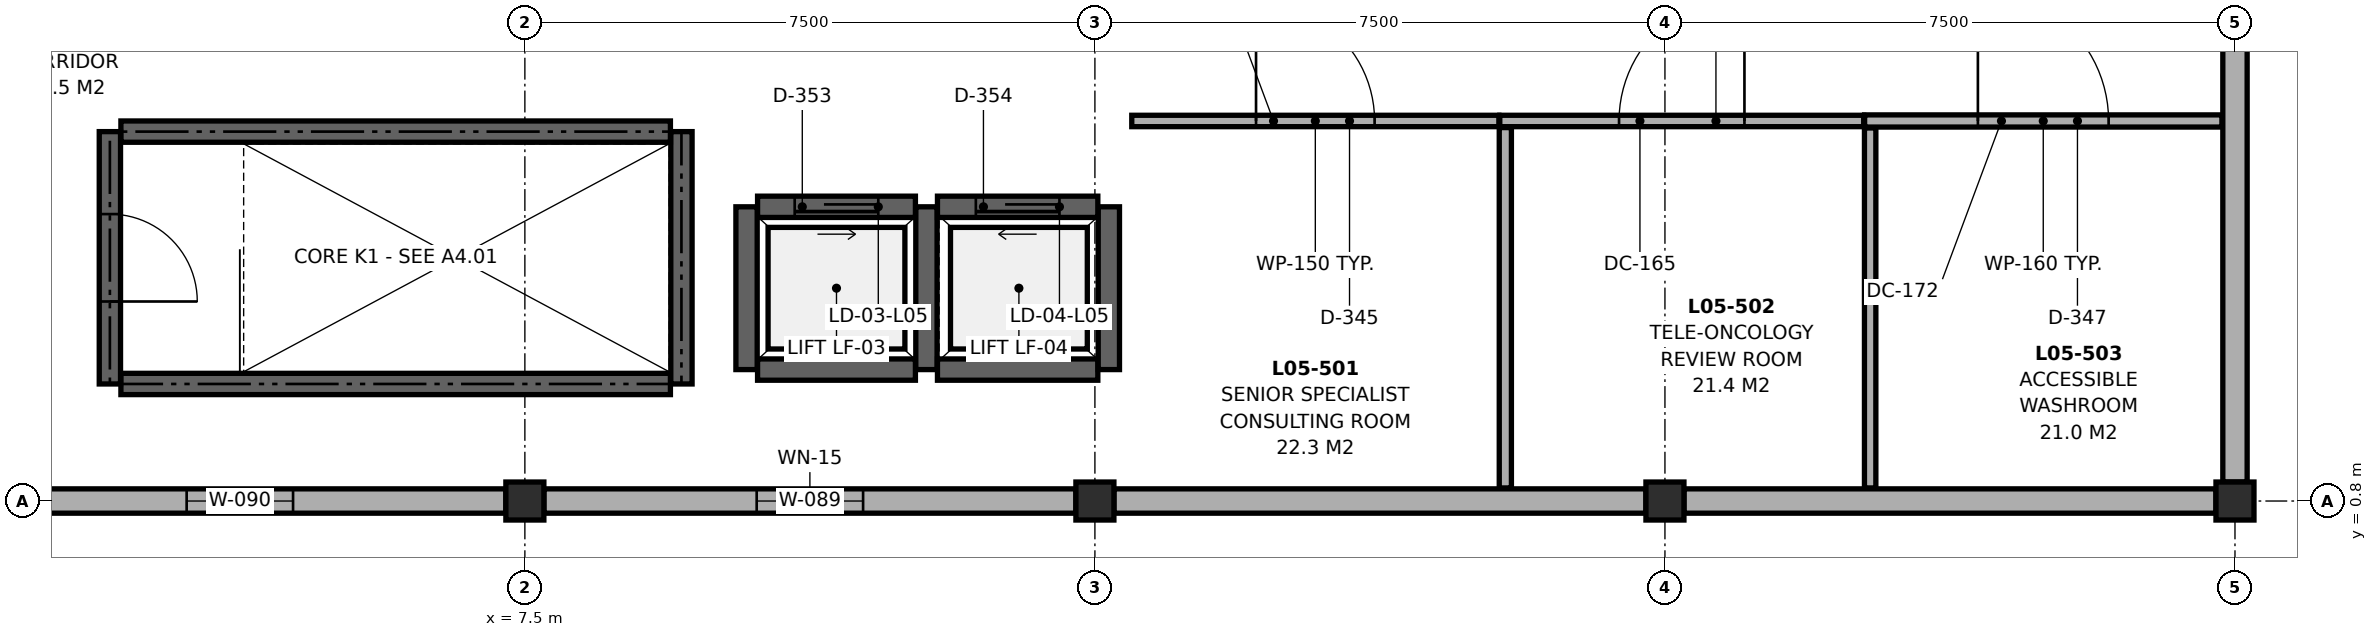
"""IFC4 building model, lengths in metres.
Left out: names, types, materials, properties, quantities, classifications, styles, units other than length and angle.
Written with IfcOpenShell. Run it as: python <this file> out.ifc"""

import sys

from ifc_helpers import new_model, si_unit, direction, frame, frame_2d, origin, origin_2d, place, context, subcontext, project, spatial, rectangle, extrude, element, fill, save


model = new_model("IFC4")
c1 = context("Model", 3, precision=1e-05, world=origin(), true_north=direction((0.0, 1.0)))
c2 = subcontext(c1, "Body", "Model", "MODEL_VIEW")
j1 = project(units=[si_unit("LENGTHUNIT", "METRE"), si_unit("PLANEANGLEUNIT", "RADIAN")], contexts=[c1])
p1 = place(None, origin())
s1 = spatial("IfcSite", under=j1, at=p1, CompositionType="ELEMENT")
p2 = place(p1, origin())
s2 = spatial("IfcBuilding", under=s1, at=p2, CompositionType="ELEMENT")
p3 = place(p2, frame((0.0, 0.0, 21.5)))
s3 = spatial("IfcBuildingStorey", under=s2, at=p3, CompositionType="ELEMENT", Elevation=21.5)
p4 = place(p3, frame((7.5, 0.8, 0.0), z_axis=(0.0, 0.0, 1.0), x_axis=(1.0, 0.0, 0.0)))
e1 = element("IfcColumn", 1, at=p4, inside=s3, PredefinedType="COLUMN", context=c2, shape_type="SweptSolid", body=[
    extrude(rectangle(XDim=0.5, YDim=0.5, at=origin_2d()), origin(), (0.0, 0.0, 1.0), 4.08),
])
p5 = place(p3, frame((15.0, 0.8, 0.0), z_axis=(0.0, 0.0, 1.0), x_axis=(1.0, 0.0, 0.0)))
e2 = element("IfcColumn", 2, at=p5, inside=s3, PredefinedType="COLUMN", context=c2, shape_type="SweptSolid", body=[
    extrude(rectangle(XDim=0.5, YDim=0.5, at=origin_2d()), origin(), (0.0, 0.0, 1.0), 4.33),
])
p6 = place(p3, frame((22.5, 0.8, 0.0), z_axis=(0.0, 0.0, 1.0), x_axis=(1.0, 0.0, 0.0)))
e3 = element("IfcColumn", 3, at=p6, inside=s3, PredefinedType="COLUMN", context=c2, shape_type="SweptSolid", body=[
    extrude(rectangle(XDim=0.5, YDim=0.5, at=origin_2d()), origin(), (0.0, 0.0, 1.0), 4.58),
])
p7 = place(p3, frame((30.0, 0.8, 0.0), z_axis=(0.0, 0.0, 1.0), x_axis=(1.0, 0.0, 0.0)))
e4 = element("IfcColumn", 4, at=p7, inside=s3, PredefinedType="COLUMN", context=c2, shape_type="SweptSolid", body=[
    extrude(rectangle(XDim=0.5, YDim=0.5, at=origin_2d()), origin(), (0.0, 0.0, 1.0), 4.83),
])
for number, where, z_axis, x_axis in (
    (5, (30.0, 8.05, 0.0), (0.0, 0.0, 1.0), (0.0, -1.0, 0.0)),
    (6, (29.75, 0.8, 0.0), (0.0, 0.0, 1.0), (-1.0, 0.0, 0.0)),
    (7, (22.25, 0.8, 0.0), (0.0, 0.0, 1.0), (-1.0, 0.0, 0.0)),
):
    element("IfcWall", number, at=place(p3, frame(where, z_axis=z_axis, x_axis=x_axis)), inside=s3, PredefinedType="SOLIDWALL", context=c2, shape_type="SweptSolid", body=[
        extrude(rectangle(XDim=7.0, YDim=0.32, at=frame_2d((3.5, 0.0))), origin(), (0.0, 0.0, 1.0), 3.7),
    ])
p8 = place(p3, frame((14.75, 0.8, 0.0), z_axis=(0.0, 0.0, 1.0), x_axis=(-1.0, 0.0, 0.0)))
e8 = element("IfcWall", 8, at=p8, inside=s3, PredefinedType="SOLIDWALL", context=c2, shape_type="SweptSolid", body=[
    extrude(rectangle(XDim=7.0, YDim=0.32, at=frame_2d((3.5, 0.0))), origin(), (0.0, 0.0, 1.0), 3.7),
])
p9 = place(p8, frame((2.8, 0.0, 0.9)))
e9 = element("IfcOpeningElement", 9, at=p9, cuts=e8, PredefinedType="OPENING", context=c2, shape_type="SweptSolid", body=[
    extrude(rectangle(XDim=1.4, YDim=1.7, at=frame_2d((0.7, 0.85))), frame((0.0, 0.172, 0.0), z_axis=(0.0, -1.0, 0.0), x_axis=(1.0, 0.0, 0.0)), (0.0, 0.0, 1.0), 0.344),
])
p10 = place(p3, frame((7.25, 0.8, 0.0), z_axis=(0.0, 0.0, 1.0), x_axis=(-1.0, 0.0, 0.0)))
e10 = element("IfcWall", 10, at=p10, inside=s3, PredefinedType="SOLIDWALL", context=c2, shape_type="SweptSolid", body=[
    extrude(rectangle(XDim=7.0, YDim=0.32, at=frame_2d((3.5, 0.0))), origin(), (0.0, 0.0, 1.0), 3.7),
])
p11 = place(p10, frame((2.8, 0.0, 0.9)))
e11 = element("IfcOpeningElement", 11, at=p11, cuts=e10, PredefinedType="OPENING", context=c2, shape_type="SweptSolid", body=[
    extrude(rectangle(XDim=1.4, YDim=1.9, at=frame_2d((0.7, 0.95))), frame((0.0, 0.172, 0.0), z_axis=(0.0, -1.0, 0.0), x_axis=(1.0, 0.0, 0.0)), (0.0, 0.0, 1.0), 0.344),
])
p12 = place(p3, frame((2.185, 2.34, 0.0), z_axis=(0.0, 0.0, 1.0), x_axis=(1.0, 0.0, 0.0)))
e12 = element("IfcWall", 12, at=p12, inside=s3, PredefinedType="SHEAR", context=c2, shape_type="SweptSolid", body=[
    extrude(rectangle(XDim=7.23, YDim=0.28, at=frame_2d((3.615, 0.0))), origin(), (0.0, 0.0, 1.0), 3.72),
])
p13 = place(p3, frame((9.56, 2.34, 0.0), z_axis=(0.0, 0.0, 1.0), x_axis=(0.0, 1.0, 0.0)))
e13 = element("IfcWall", 13, at=p13, inside=s3, PredefinedType="SHEAR", context=c2, shape_type="SweptSolid", body=[
    extrude(rectangle(XDim=3.32, YDim=0.28, at=frame_2d((1.66, 0.0))), origin(), (0.0, 0.0, 1.0), 3.72),
])
p14 = place(p3, frame((9.415, 5.66, 0.0), z_axis=(0.0, 0.0, 1.0), x_axis=(-1.0, 0.0, 0.0)))
e14 = element("IfcWall", 14, at=p14, inside=s3, PredefinedType="SHEAR", context=c2, shape_type="SweptSolid", body=[
    extrude(rectangle(XDim=7.23, YDim=0.28, at=frame_2d((3.615, 0.0))), origin(), (0.0, 0.0, 1.0), 3.72),
])
p15 = place(p3, frame((2.04, 5.66, 0.0), z_axis=(0.0, 0.0, 1.0), x_axis=(0.0, -1.0, 0.0)))
e15 = element("IfcWall", 15, at=p15, inside=s3, PredefinedType="SHEAR", context=c2, shape_type="SweptSolid", body=[
    extrude(rectangle(XDim=3.32, YDim=0.28, at=frame_2d((1.66, 0.0))), origin(), (0.0, 0.0, 1.0), 3.72),
])
p16 = place(p15, frame((1.085, 0.0, 0.0)))
e16 = element("IfcOpeningElement", 16, at=p16, cuts=e15, PredefinedType="OPENING", context=c2, shape_type="SweptSolid", body=[
    extrude(rectangle(XDim=1.15, YDim=2.15, at=frame_2d((0.575, 1.075))), frame((0.0, 0.152, 0.0), z_axis=(0.0, -1.0, 0.0), x_axis=(1.0, 0.0, 0.0)), (0.0, 0.0, 1.0), 0.304),
])
p17 = place(p3, frame((10.562, 2.529, 0.0), z_axis=(0.0, 0.0, 1.0), x_axis=(1.0, 0.0, 0.0)))
e17 = element("IfcWall", 17, at=p17, inside=s3, PredefinedType="SHEAR", context=c2, shape_type="SweptSolid", body=[
    extrude(rectangle(XDim=2.077, YDim=0.28, at=frame_2d((1.039, 0.0))), origin(), (0.0, 0.0, 1.0), 5.3),
])
p18 = place(p3, frame((12.783, 2.529, 0.0), z_axis=(0.0, 0.0, 1.0), x_axis=(0.0, 1.0, 0.0)))
e18 = element("IfcWall", 18, at=p18, inside=s3, PredefinedType="SHEAR", context=c2, shape_type="SweptSolid", body=[
    extrude(rectangle(XDim=2.141, YDim=0.28, at=frame_2d((1.071, 0.0))), origin(), (0.0, 0.0, 1.0), 5.3),
])
p19 = place(p3, frame((12.638, 4.671, 0.0), z_axis=(0.0, 0.0, 1.0), x_axis=(-1.0, 0.0, 0.0)))
e19 = element("IfcWall", 19, at=p19, inside=s3, PredefinedType="SHEAR", context=c2, shape_type="SweptSolid", body=[
    extrude(rectangle(XDim=2.077, YDim=0.28, at=frame_2d((1.039, 0.0))), origin(), (0.0, 0.0, 1.0), 5.3),
])
p20 = place(p19, frame((0.489, 0.0, 0.0)))
e20 = element("IfcOpeningElement", 20, at=p20, cuts=e19, PredefinedType="OPENING", context=c2, shape_type="SweptSolid", body=[
    extrude(rectangle(XDim=1.1, YDim=2.15, at=frame_2d((0.55, 1.075))), frame((0.0, 0.152, 0.0), z_axis=(0.0, -1.0, 0.0), x_axis=(1.0, 0.0, 0.0)), (0.0, 0.0, 1.0), 0.304),
])
p21 = place(p3, frame((10.417, 4.671, 0.0), z_axis=(0.0, 0.0, 1.0), x_axis=(0.0, -1.0, 0.0)))
e21 = element("IfcWall", 21, at=p21, inside=s3, PredefinedType="SHEAR", context=c2, shape_type="SweptSolid", body=[
    extrude(rectangle(XDim=2.141, YDim=0.28, at=frame_2d((1.071, 0.0))), origin(), (0.0, 0.0, 1.0), 5.3),
])
p22 = place(p3, frame((12.928, 2.529, 0.0), z_axis=(0.0, 0.0, 1.0), x_axis=(1.0, 0.0, 0.0)))
e22 = element("IfcWall", 22, at=p22, inside=s3, PredefinedType="SHEAR", context=c2, shape_type="SweptSolid", body=[
    extrude(rectangle(XDim=2.11, YDim=0.28, at=frame_2d((1.055, 0.0))), origin(), (0.0, 0.0, 1.0), 5.3),
])
p23 = place(p3, frame((15.184, 2.529, 0.0), z_axis=(0.0, 0.0, 1.0), x_axis=(0.0, 1.0, 0.0)))
e23 = element("IfcWall", 23, at=p23, inside=s3, PredefinedType="SHEAR", context=c2, shape_type="SweptSolid", body=[
    extrude(rectangle(XDim=2.141, YDim=0.28, at=frame_2d((1.071, 0.0))), origin(), (0.0, 0.0, 1.0), 5.3),
])
p24 = place(p3, frame((15.039, 4.671, 0.0), z_axis=(0.0, 0.0, 1.0), x_axis=(-1.0, 0.0, 0.0)))
e24 = element("IfcWall", 24, at=p24, inside=s3, PredefinedType="SHEAR", context=c2, shape_type="SweptSolid", body=[
    extrude(rectangle(XDim=2.11, YDim=0.28, at=frame_2d((1.055, 0.0))), origin(), (0.0, 0.0, 1.0), 5.3),
])
p25 = place(p24, frame((0.505, 0.0, 0.0)))
e25 = element("IfcOpeningElement", 25, at=p25, cuts=e24, PredefinedType="OPENING", context=c2, shape_type="SweptSolid", body=[
    extrude(rectangle(XDim=1.1, YDim=2.15, at=frame_2d((0.55, 1.075))), frame((0.0, 0.152, 0.0), z_axis=(0.0, -1.0, 0.0), x_axis=(1.0, 0.0, 0.0)), (0.0, 0.0, 1.0), 0.304),
])
p26 = place(p3, frame((15.485, 5.8, 0.0), z_axis=(0.0, 0.0, 1.0), x_axis=(1.0, 0.0, 0.0)))
e26 = element("IfcWall", 26, at=p26, inside=s3, PredefinedType="PARTITIONING", context=c2, shape_type="SweptSolid", body=[
    extrude(rectangle(XDim=4.83, YDim=0.15, at=frame_2d((2.415, 0.0))), origin(), (0.0, 0.0, 1.0), 3.7),
])
p27 = place(p26, frame((1.635, 0.0, 0.0)))
e27 = element("IfcOpeningElement", 27, at=p27, cuts=e26, PredefinedType="OPENING", context=c2, shape_type="SweptSolid", body=[
    extrude(rectangle(XDim=1.56, YDim=2.3, at=frame_2d((0.78, 1.15))), frame((0.0, 0.087, 0.0), z_axis=(0.0, -1.0, 0.0), x_axis=(1.0, 0.0, 0.0)), (0.0, 0.0, 1.0), 0.174),
])
p28 = place(p3, frame((20.327, 5.8, 0.0), z_axis=(0.0, 0.0, 1.0), x_axis=(1.0, 0.0, 0.0)))
e28 = element("IfcWall", 28, at=p28, inside=s3, PredefinedType="PARTITIONING", context=c2, shape_type="SweptSolid", body=[
    extrude(rectangle(XDim=4.788, YDim=0.15, at=frame_2d((2.394, 0.0))), origin(), (0.0, 0.0, 1.0), 3.7),
])
p29 = place(p28, frame((1.569, 0.0, 0.0)))
e29 = element("IfcOpeningElement", 29, at=p29, cuts=e28, PredefinedType="OPENING", context=c2, shape_type="SweptSolid", body=[
    extrude(rectangle(XDim=1.65, YDim=2.32, at=frame_2d((0.825, 1.16))), frame((0.0, 0.087, 0.0), z_axis=(0.0, -1.0, 0.0), x_axis=(1.0, 0.0, 0.0)), (0.0, 0.0, 1.0), 0.174),
])
p30 = place(p3, frame((25.127, 5.8, 0.0), z_axis=(0.0, 0.0, 1.0), x_axis=(1.0, 0.0, 0.0)))
e30 = element("IfcWall", 30, at=p30, inside=s3, PredefinedType="PARTITIONING", context=c2, shape_type="SweptSolid", body=[
    extrude(rectangle(XDim=4.701, YDim=0.16, at=frame_2d((2.351, 0.0))), origin(), (0.0, 0.0, 1.0), 3.7),
])
p31 = place(p30, frame((1.49, 0.0, 0.0)))
e31 = element("IfcOpeningElement", 31, at=p31, cuts=e30, PredefinedType="OPENING", context=c2, shape_type="SweptSolid", body=[
    extrude(rectangle(XDim=1.72, YDim=2.34, at=frame_2d((0.86, 1.17))), frame((0.0, 0.092, 0.0), z_axis=(0.0, -1.0, 0.0), x_axis=(1.0, 0.0, 0.0)), (0.0, 0.0, 1.0), 0.184),
])
p32 = place(p3, frame((20.4, 0.972, 0.0), z_axis=(0.0, 0.0, 1.0), x_axis=(0.0, 1.0, 0.0)))
e32 = element("IfcWall", 32, at=p32, inside=s3, PredefinedType="PARTITIONING", context=c2, shape_type="SweptSolid", body=[
    extrude(rectangle(XDim=4.741, YDim=0.16, at=frame_2d((2.371, 0.0))), origin(), (0.0, 0.0, 1.0), 3.7),
])
p33 = place(p3, frame((25.2, 0.972, 0.0), z_axis=(0.0, 0.0, 1.0), x_axis=(0.0, 1.0, 0.0)))
e33 = element("IfcWall", 33, at=p33, inside=s3, PredefinedType="PARTITIONING", context=c2, shape_type="SweptSolid", body=[
    extrude(rectangle(XDim=4.736, YDim=0.15, at=frame_2d((2.368, 0.0))), origin(), (0.0, 0.0, 1.0), 3.7),
])
p34 = place(p9, origin())
e34 = element("IfcWindow", 34, at=p34, inside=s3, PartitioningType="SINGLE_PANEL", PredefinedType="WINDOW", context=c2, shape_type="SweptSolid", body=[
    extrude(rectangle(XDim=1.4, YDim=1.7, at=frame_2d((0.7, 0.85))), frame((0.0, 0.03, 0.0), z_axis=(0.0, -1.0, 0.0), x_axis=(1.0, 0.0, 0.0)), (0.0, 0.0, 1.0), 0.06),
])
fill(e9, e34)
p35 = place(p11, origin())
e35 = element("IfcWindow", 35, at=p35, inside=s3, PartitioningType="SINGLE_PANEL", PredefinedType="WINDOW", context=c2, shape_type="SweptSolid", body=[
    extrude(rectangle(XDim=1.4, YDim=1.9, at=frame_2d((0.7, 0.95))), frame((0.0, 0.03, 0.0), z_axis=(0.0, -1.0, 0.0), x_axis=(1.0, 0.0, 0.0)), (0.0, 0.0, 1.0), 0.06),
])
fill(e11, e35)
p36 = place(p16, origin())
e36 = element("IfcDoor", 36, at=p36, inside=s3, OperationType="SINGLE_SWING_RIGHT", PredefinedType="DOOR", context=c2, shape_type="SweptSolid", body=[
    extrude(rectangle(XDim=1.15, YDim=2.15, at=frame_2d((0.575, 1.075))), frame((0.0, 0.025, 0.0), z_axis=(0.0, -1.0, 0.0), x_axis=(1.0, 0.0, 0.0)), (0.0, 0.0, 1.0), 0.05),
])
fill(e16, e36)
p37 = place(p20, origin())
e37 = element("IfcDoor", 37, at=p37, inside=s3, OperationType="SLIDING_TO_LEFT", PredefinedType="DOOR", context=c2, shape_type="SweptSolid", body=[
    extrude(rectangle(XDim=1.1, YDim=2.15, at=frame_2d((0.55, 1.075))), frame((0.0, 0.025, 0.0), z_axis=(0.0, -1.0, 0.0), x_axis=(1.0, 0.0, 0.0)), (0.0, 0.0, 1.0), 0.05),
])
fill(e20, e37)
p38 = place(p25, origin())
e38 = element("IfcDoor", 38, at=p38, inside=s3, OperationType="SLIDING_TO_RIGHT", PredefinedType="DOOR", context=c2, shape_type="SweptSolid", body=[
    extrude(rectangle(XDim=1.1, YDim=2.15, at=frame_2d((0.55, 1.075))), frame((0.0, 0.025, 0.0), z_axis=(0.0, -1.0, 0.0), x_axis=(1.0, 0.0, 0.0)), (0.0, 0.0, 1.0), 0.05),
])
fill(e25, e38)
p39 = place(p27, origin())
e39 = element("IfcDoor", 39, at=p39, inside=s3, OperationType="SINGLE_SWING_LEFT", PredefinedType="DOOR", context=c2, shape_type="SweptSolid", body=[
    extrude(rectangle(XDim=1.56, YDim=2.3, at=frame_2d((0.78, 1.15))), frame((0.0, 0.025, 0.0), z_axis=(0.0, -1.0, 0.0), x_axis=(1.0, 0.0, 0.0)), (0.0, 0.0, 1.0), 0.05),
])
fill(e27, e39)
p40 = place(p29, origin())
e40 = element("IfcDoor", 40, at=p40, inside=s3, OperationType="SINGLE_SWING_RIGHT", PredefinedType="DOOR", context=c2, shape_type="SweptSolid", body=[
    extrude(rectangle(XDim=1.65, YDim=2.32, at=frame_2d((0.825, 1.16))), frame((0.0, 0.025, 0.0), z_axis=(0.0, -1.0, 0.0), x_axis=(1.0, 0.0, 0.0)), (0.0, 0.0, 1.0), 0.05),
])
fill(e29, e40)
p41 = place(p31, origin())
e41 = element("IfcDoor", 41, at=p41, inside=s3, OperationType="SINGLE_SWING_LEFT", PredefinedType="DOOR", context=c2, shape_type="SweptSolid", body=[
    extrude(rectangle(XDim=1.72, YDim=2.34, at=frame_2d((0.86, 1.17))), frame((0.0, 0.025, 0.0), z_axis=(0.0, -1.0, 0.0), x_axis=(1.0, 0.0, 0.0)), (0.0, 0.0, 1.0), 0.05),
])
fill(e31, e41)
save(model, sys.argv[1])
